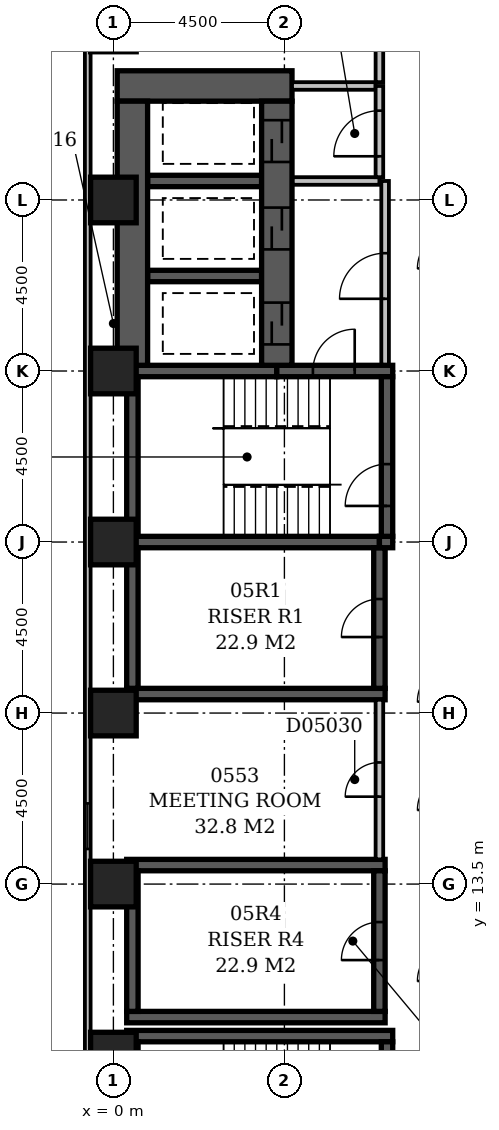
"""IFC4 building model, lengths in metres.
Left out: names, types, materials, properties, quantities, classifications, styles, units other than length and angle.
Written with IfcOpenShell. Run it as: python <this file> out.ifc"""

import sys

from ifc_helpers import new_model, si_unit, direction, frame, frame_2d, origin, origin_2d, place, context, subcontext, project, spatial, rectangle, extrude, element, fill, save


model = new_model("IFC4")
c1 = context("Model", 3, precision=1e-05, world=origin(), true_north=direction((0.0, 1.0)))
c2 = subcontext(c1, "Body", "Model", "MODEL_VIEW")
j1 = project(units=[si_unit("LENGTHUNIT", "METRE"), si_unit("PLANEANGLEUNIT", "RADIAN")], contexts=[c1])
p1 = place(None, origin())
s1 = spatial("IfcSite", under=j1, at=p1, CompositionType="ELEMENT")
p2 = place(p1, origin())
s2 = spatial("IfcBuilding", under=s1, at=p2, CompositionType="ELEMENT")
p3 = place(p2, frame((0.0, 0.0, 29.0)))
s3 = spatial("IfcBuildingStorey", under=s2, at=p3, CompositionType="ELEMENT", Elevation=29.0)
p4 = place(p3, frame((0.1, 34.5, -0.3), z_axis=(0.0, 0.0, 1.0), x_axis=(1.0, 0.0, 0.0)))
e1 = element("IfcWall", 1, at=p4, inside=s3, PredefinedType="SHEAR", context=c2, shape_type="SweptSolid", body=[
    extrude(rectangle(XDim=4.6, YDim=0.8, at=frame_2d((2.3, 0.0))), origin(), (0.0, 0.0, 1.0), 3.6),
])
p5 = place(p3, frame((0.35, 9.5, -0.3), z_axis=(0.0, 0.0, 1.0), x_axis=(1.0, 0.0, 0.0)))
e2 = element("IfcWall", 2, at=p5, inside=s3, PredefinedType="SHEAR", context=c2, shape_type="SweptSolid", body=[
    extrude(rectangle(XDim=7.0, YDim=0.3, at=frame_2d((3.5, 0.0))), origin(), (0.0, 0.0, 1.0), 3.6),
])
for number, where, z_axis, x_axis in (
    (3, (0.35, 10.0, -0.3), (0.0, 0.0, 1.0), (1.0, 0.0, 0.0)),
    (4, (0.35, 14.0, -0.3), (0.0, 0.0, 1.0), (1.0, 0.0, 0.0)),
    (5, (0.35, 18.5, -0.3), (0.0, 0.0, 1.0), (1.0, 0.0, 0.0)),
):
    element("IfcWall", number, at=place(p3, frame(where, z_axis=z_axis, x_axis=x_axis)), inside=s3, PredefinedType="SHEAR", context=c2, shape_type="SweptSolid", body=[
        extrude(rectangle(XDim=6.8, YDim=0.3, at=frame_2d((3.4, 0.0))), origin(), (0.0, 0.0, 1.0), 3.6),
    ])
p6 = place(p3, frame((0.35, 22.5, -0.3), z_axis=(0.0, 0.0, 1.0), x_axis=(1.0, 0.0, 0.0)))
e6 = element("IfcWall", 6, at=p6, inside=s3, PredefinedType="SHEAR", context=c2, shape_type="SweptSolid", body=[
    extrude(rectangle(XDim=6.65, YDim=0.3, at=frame_2d((3.325, 0.0))), origin(), (0.0, 0.0, 1.0), 3.6),
])
p7 = place(p3, frame((0.35, 27.0, -0.3), z_axis=(0.0, 0.0, 1.0), x_axis=(1.0, 0.0, 0.0)))
e7 = element("IfcWall", 7, at=p7, inside=s3, PredefinedType="SHEAR", context=c2, shape_type="SweptSolid", body=[
    extrude(rectangle(XDim=3.95, YDim=0.3, at=frame_2d((1.975, 0.0))), origin(), (0.0, 0.0, 1.0), 3.6),
])
p8 = place(p3, frame((0.5, 5.15, -0.3), z_axis=(0.0, 0.0, 1.0), x_axis=(0.0, 1.0, 0.0)))
e8 = element("IfcWall", 8, at=p8, inside=s3, PredefinedType="SHEAR", context=c2, shape_type="SweptSolid", body=[
    extrude(rectangle(XDim=4.2, YDim=0.3, at=frame_2d((2.1, 0.0))), origin(), (0.0, 0.0, 1.0), 3.6),
])
for number, where, z_axis, x_axis in (
    (9, (0.5, 10.15, -0.3), (0.0, 0.0, 1.0), (0.0, 1.0, 0.0)),
    (10, (0.5, 18.65, -0.3), (0.0, 0.0, 1.0), (0.0, 1.0, 0.0)),
):
    element("IfcWall", number, at=place(p3, frame(where, z_axis=z_axis, x_axis=x_axis)), inside=s3, PredefinedType="SHEAR", context=c2, shape_type="SweptSolid", body=[
        extrude(rectangle(XDim=3.7, YDim=0.3, at=frame_2d((1.85, 0.0))), origin(), (0.0, 0.0, 1.0), 3.6),
    ])
p9 = place(p3, frame((0.5, 22.65, -0.3), z_axis=(0.0, 0.0, 1.0), x_axis=(0.0, 1.0, 0.0)))
e11 = element("IfcWall", 11, at=p9, inside=s3, PredefinedType="SHEAR", context=c2, shape_type="SweptSolid", body=[
    extrude(rectangle(XDim=4.2, YDim=0.3, at=frame_2d((2.1, 0.0))), origin(), (0.0, 0.0, 1.0), 3.6),
])
p10 = place(p3, frame((0.5, 27.15, -0.3), z_axis=(0.0, 0.0, 1.0), x_axis=(0.0, 1.0, 0.0)))
e12 = element("IfcWall", 12, at=p10, inside=s3, PredefinedType="SHEAR", context=c2, shape_type="SweptSolid", body=[
    extrude(rectangle(XDim=6.95, YDim=0.8, at=frame_2d((3.475, 0.0))), origin(), (0.0, 0.0, 1.0), 3.6),
])
for number, where, z_axis, x_axis in (
    (13, (0.9, 29.5, -0.3), (0.0, 0.0, 1.0), (1.0, 0.0, 0.0)),
    (14, (0.9, 32.0, -0.3), (0.0, 0.0, 1.0), (1.0, 0.0, 0.0)),
):
    element("IfcWall", number, at=place(p3, frame(where, z_axis=z_axis, x_axis=x_axis)), inside=s3, PredefinedType="SHEAR", context=c2, shape_type="SweptSolid", body=[
        extrude(rectangle(XDim=3.0, YDim=0.3, at=frame_2d((1.5, 0.0))), origin(), (0.0, 0.0, 1.0), 3.6),
    ])
p11 = place(p3, frame((4.3, 27.0, -0.3), z_axis=(0.0, 0.0, 1.0), x_axis=(1.0, 0.0, 0.0)))
e15 = element("IfcWall", 15, at=p11, inside=s3, PredefinedType="SHEAR", context=c2, shape_type="SweptSolid", body=[
    extrude(rectangle(XDim=3.05, YDim=0.3, at=frame_2d((1.525, 0.0))), origin(), (0.0, 0.0, 1.0), 3.6),
])
p12 = place(p11, frame((0.95, 0.0, 0.3)))
e16 = element("IfcOpeningElement", 16, at=p12, cuts=e15, PredefinedType="OPENING", context=c2, shape_type="SweptSolid", body=[
    extrude(rectangle(XDim=1.1, YDim=2.1, at=frame_2d((0.55, 1.05))), frame((0.0, 0.162, 0.0), z_axis=(0.0, -1.0, 0.0), x_axis=(1.0, 0.0, 0.0)), (0.0, 0.0, 1.0), 0.324),
])
p13 = place(p3, frame((4.3, 27.15, -0.3), z_axis=(0.0, 0.0, 1.0), x_axis=(0.0, 1.0, 0.0)))
e17 = element("IfcWall", 17, at=p13, inside=s3, PredefinedType="SHEAR", context=c2, shape_type="SweptSolid", body=[
    extrude(rectangle(XDim=6.95, YDim=0.8, at=frame_2d((3.475, 0.0))), origin(), (0.0, 0.0, 1.0), 3.6),
])
p14 = place(p13, frame((3.05, 0.0, 0.3)))
e18 = element("IfcOpeningElement", 18, at=p14, cuts=e17, PredefinedType="OPENING", context=c2, shape_type="SweptSolid", body=[
    extrude(rectangle(XDim=1.1, YDim=2.1, at=frame_2d((0.55, 1.05))), frame((0.0, 0.412, 0.0), z_axis=(0.0, -1.0, 0.0), x_axis=(1.0, 0.0, 0.0)), (0.0, 0.0, 1.0), 0.824),
])
p15 = place(p13, frame((0.55, 0.0, 0.3)))
e19 = element("IfcOpeningElement", 19, at=p15, cuts=e17, PredefinedType="OPENING", context=c2, shape_type="SweptSolid", body=[
    extrude(rectangle(XDim=1.1, YDim=2.1, at=frame_2d((0.55, 1.05))), frame((0.0, 0.412, 0.0), z_axis=(0.0, -1.0, 0.0), x_axis=(1.0, 0.0, 0.0)), (0.0, 0.0, 1.0), 0.824),
])
p16 = place(p13, frame((5.35, 0.0, 0.3)))
e20 = element("IfcOpeningElement", 20, at=p16, cuts=e17, PredefinedType="OPENING", context=c2, shape_type="SweptSolid", body=[
    extrude(rectangle(XDim=1.1, YDim=2.1, at=frame_2d((0.55, 1.05))), frame((0.0, 0.412, 0.0), z_axis=(0.0, -1.0, 0.0), x_axis=(1.0, 0.0, 0.0)), (0.0, 0.0, 1.0), 0.824),
])
p17 = place(p3, frame((7.0, 10.15, -0.3), z_axis=(0.0, 0.0, 1.0), x_axis=(0.0, 1.0, 0.0)))
e21 = element("IfcWall", 21, at=p17, inside=s3, PredefinedType="SHEAR", context=c2, shape_type="SweptSolid", body=[
    extrude(rectangle(XDim=3.7, YDim=0.3, at=frame_2d((1.85, 0.0))), origin(), (0.0, 0.0, 1.0), 3.6),
])
p18 = place(p17, frame((1.35, 0.0, 0.3)))
e22 = element("IfcOpeningElement", 22, at=p18, cuts=e21, PredefinedType="OPENING", context=c2, shape_type="SweptSolid", body=[
    extrude(rectangle(XDim=1.0, YDim=2.1, at=frame_2d((0.5, 1.05))), frame((0.0, 0.162, 0.0), z_axis=(0.0, -1.0, 0.0), x_axis=(1.0, 0.0, 0.0)), (0.0, 0.0, 1.0), 0.324),
])
p19 = place(p3, frame((7.0, 18.65, -0.3), z_axis=(0.0, 0.0, 1.0), x_axis=(0.0, 1.0, 0.0)))
e23 = element("IfcWall", 23, at=p19, inside=s3, PredefinedType="SHEAR", context=c2, shape_type="SweptSolid", body=[
    extrude(rectangle(XDim=3.7, YDim=0.3, at=frame_2d((1.85, 0.0))), origin(), (0.0, 0.0, 1.0), 3.6),
])
p20 = place(p19, frame((1.35, 0.0, 0.3)))
e24 = element("IfcOpeningElement", 24, at=p20, cuts=e23, PredefinedType="OPENING", context=c2, shape_type="SweptSolid", body=[
    extrude(rectangle(XDim=1.0, YDim=2.1, at=frame_2d((0.5, 1.05))), frame((0.0, 0.162, 0.0), z_axis=(0.0, -1.0, 0.0), x_axis=(1.0, 0.0, 0.0)), (0.0, 0.0, 1.0), 0.324),
])
p21 = place(p3, frame((7.0, 22.5, -0.3), z_axis=(0.0, 0.0, 1.0), x_axis=(1.0, 0.0, 0.0)))
e25 = element("IfcWall", 25, at=p21, inside=s3, PredefinedType="SHEAR", context=c2, shape_type="SweptSolid", body=[
    extrude(rectangle(XDim=0.35, YDim=0.3, at=frame_2d((0.175, 0.0))), origin(), (0.0, 0.0, 1.0), 3.6),
])
p22 = place(p3, frame((7.2, 5.15, -0.3), z_axis=(0.0, 0.0, 1.0), x_axis=(0.0, 1.0, 0.0)))
e26 = element("IfcWall", 26, at=p22, inside=s3, PredefinedType="SHEAR", context=c2, shape_type="SweptSolid", body=[
    extrude(rectangle(XDim=4.2, YDim=0.3, at=frame_2d((2.1, 0.0))), origin(), (0.0, 0.0, 1.0), 3.6),
])
p23 = place(p22, frame((1.55, 0.0, 0.3)))
e27 = element("IfcOpeningElement", 27, at=p23, cuts=e26, PredefinedType="OPENING", context=c2, shape_type="SweptSolid", body=[
    extrude(rectangle(XDim=1.1, YDim=2.1, at=frame_2d((0.55, 1.05))), frame((0.0, 0.162, 0.0), z_axis=(0.0, -1.0, 0.0), x_axis=(1.0, 0.0, 0.0)), (0.0, 0.0, 1.0), 0.324),
])
p24 = place(p3, frame((7.2, 22.65, -0.3), z_axis=(0.0, 0.0, 1.0), x_axis=(0.0, 1.0, 0.0)))
e28 = element("IfcWall", 28, at=p24, inside=s3, PredefinedType="SHEAR", context=c2, shape_type="SweptSolid", body=[
    extrude(rectangle(XDim=4.2, YDim=0.3, at=frame_2d((2.1, 0.0))), origin(), (0.0, 0.0, 1.0), 3.6),
])
p25 = place(p24, frame((0.8, 0.0, 0.3)))
e29 = element("IfcOpeningElement", 29, at=p25, cuts=e28, PredefinedType="OPENING", context=c2, shape_type="SweptSolid", body=[
    extrude(rectangle(XDim=1.1, YDim=2.1, at=frame_2d((0.55, 1.05))), frame((0.0, 0.162, 0.0), z_axis=(0.0, -1.0, 0.0), x_axis=(1.0, 0.0, 0.0)), (0.0, 0.0, 1.0), 0.324),
])
for number, where, z_axis, x_axis in (
    (30, (0.0, 9.0, -0.3), (0.0, 0.0, 1.0), (1.0, 0.0, 0.0)),
    (31, (0.0, 13.5, -0.3), (0.0, 0.0, 1.0), (1.0, 0.0, 0.0)),
    (32, (0.0, 18.0, -0.3), (0.0, 0.0, 1.0), (1.0, 0.0, 0.0)),
    (33, (0.0, 22.5, -0.3), (0.0, 0.0, 1.0), (1.0, 0.0, 0.0)),
    (34, (0.0, 27.0, -0.3), (0.0, 0.0, 1.0), (1.0, 0.0, 0.0)),
    (35, (0.0, 31.5, -0.3), (0.0, 0.0, 1.0), (1.0, 0.0, 0.0)),
):
    element("IfcColumn", number, at=place(p3, frame(where, z_axis=z_axis, x_axis=x_axis)), inside=s3, PredefinedType="COLUMN", context=c2, shape_type="SweptSolid", body=[
        extrude(rectangle(XDim=1.2, YDim=1.2, at=origin_2d()), origin(), (0.0, 0.0, 1.0), 3.6),
    ])
p26 = place(p3, frame((-0.675, 59.1, 0.0), z_axis=(0.0, 0.0, 1.0), x_axis=(0.0, -1.0, 0.0)))
e36 = element("IfcWall", 36, at=p26, inside=s3, PredefinedType="STANDARD", context=c2, shape_type="SweptSolid", body=[
    extrude(rectangle(XDim=55.35, YDim=0.15, at=frame_2d((27.675, 0.0))), origin(), (0.0, 0.0, 1.0), 2.7),
])
p27 = place(p26, frame((10.523, 0.0, 0.6)))
e37 = element("IfcOpeningElement", 37, at=p27, cuts=e36, PredefinedType="OPENING", context=c2, shape_type="SweptSolid", body=[
    extrude(rectangle(XDim=1.2, YDim=1.8, at=frame_2d((0.6, 0.9))), frame((0.0, 0.087, 0.0), z_axis=(0.0, -1.0, 0.0), x_axis=(1.0, 0.0, 0.0)), (0.0, 0.0, 1.0), 0.174),
])
p28 = place(p26, frame((16.477, 0.0, 0.6)))
e38 = element("IfcOpeningElement", 38, at=p28, cuts=e36, PredefinedType="OPENING", context=c2, shape_type="SweptSolid", body=[
    extrude(rectangle(XDim=1.2, YDim=1.8, at=frame_2d((0.6, 0.9))), frame((0.0, 0.087, 0.0), z_axis=(0.0, -1.0, 0.0), x_axis=(1.0, 0.0, 0.0)), (0.0, 0.0, 1.0), 0.174),
])
p29 = place(p26, frame((19.65, 0.0, 0.6)))
e39 = element("IfcOpeningElement", 39, at=p29, cuts=e36, PredefinedType="OPENING", context=c2, shape_type="SweptSolid", body=[
    extrude(rectangle(XDim=2.4, YDim=1.8, at=frame_2d((1.2, 0.9))), frame((0.0, 0.087, 0.0), z_axis=(0.0, -1.0, 0.0), x_axis=(1.0, 0.0, 0.0)), (0.0, 0.0, 1.0), 0.174),
])
p30 = place(p26, frame((43.477, 0.0, 0.6)))
e40 = element("IfcOpeningElement", 40, at=p30, cuts=e36, PredefinedType="OPENING", context=c2, shape_type="SweptSolid", body=[
    extrude(rectangle(XDim=1.2, YDim=1.8, at=frame_2d((0.6, 0.9))), frame((0.0, 0.087, 0.0), z_axis=(0.0, -1.0, 0.0), x_axis=(1.0, 0.0, 0.0)), (0.0, 0.0, 1.0), 0.174),
])
p31 = place(p3, frame((4.72, 32.0, 0.0), z_axis=(0.0, 0.0, 1.0), x_axis=(1.0, 0.0, 0.0)))
e41 = element("IfcWall", 41, at=p31, inside=s3, PredefinedType="PARTITIONING", context=c2, shape_type="SweptSolid", body=[
    extrude(rectangle(XDim=2.28, YDim=0.2, at=frame_2d((1.14, 0.0))), origin(), (0.0, 0.0, 1.0), 3.3),
])
p32 = place(p3, frame((7.0, 32.1, 0.0), z_axis=(0.0, 0.0, 1.0), x_axis=(0.0, 1.0, 0.0)))
e42 = element("IfcWall", 42, at=p32, inside=s3, PredefinedType="PARTITIONING", context=c2, shape_type="SweptSolid", body=[
    extrude(rectangle(XDim=2.4, YDim=0.2, at=frame_2d((1.2, 0.0))), origin(), (0.0, 0.0, 1.0), 3.3),
])
p33 = place(p32, frame((0.55, 0.0, 0.0)))
e43 = element("IfcOpeningElement", 43, at=p33, cuts=e42, PredefinedType="OPENING", context=c2, shape_type="SweptSolid", body=[
    extrude(rectangle(XDim=1.2, YDim=2.1, at=frame_2d((0.6, 1.05))), frame((0.0, 0.112, 0.0), z_axis=(0.0, -1.0, 0.0), x_axis=(1.0, 0.0, 0.0)), (0.0, 0.0, 1.0), 0.224),
])
p34 = place(p3, frame((4.7, 34.5, 0.0), z_axis=(0.0, 0.0, 1.0), x_axis=(1.0, 0.0, 0.0)))
e44 = element("IfcWall", 44, at=p34, inside=s3, PredefinedType="PARTITIONING", context=c2, shape_type="SweptSolid", body=[
    extrude(rectangle(XDim=2.2, YDim=0.2, at=frame_2d((1.1, 0.0))), origin(), (0.0, 0.0, 1.0), 3.3),
])
p35 = place(p3, frame((7.15, 27.17, 0.0), z_axis=(0.0, 0.0, 1.0), x_axis=(0.0, 1.0, 0.0)))
e45 = element("IfcWall", 45, at=p35, inside=s3, PredefinedType="PARTITIONING", context=c2, shape_type="SweptSolid", body=[
    extrude(rectangle(XDim=4.83, YDim=0.2, at=frame_2d((2.415, 0.0))), origin(), (0.0, 0.0, 1.0), 3.3),
])
p36 = place(p35, frame((1.73, 0.0, 0.0)))
e46 = element("IfcOpeningElement", 46, at=p36, cuts=e45, PredefinedType="OPENING", context=c2, shape_type="SweptSolid", body=[
    extrude(rectangle(XDim=1.2, YDim=2.1, at=frame_2d((0.6, 1.05))), frame((0.0, 0.112, 0.0), z_axis=(0.0, -1.0, 0.0), x_axis=(1.0, 0.0, 0.0)), (0.0, 0.0, 1.0), 0.224),
])
p37 = place(p3, frame((7.0, 14.15, 0.0), z_axis=(0.0, 0.0, 1.0), x_axis=(0.0, 1.0, 0.0)))
e47 = element("IfcWall", 47, at=p37, inside=s3, PredefinedType="PARTITIONING", context=c2, shape_type="SweptSolid", body=[
    extrude(rectangle(XDim=4.2, YDim=0.2, at=frame_2d((2.1, 0.0))), origin(), (0.0, 0.0, 1.0), 3.3),
])
p38 = place(p37, frame((1.65, 0.0, 0.0)))
e48 = element("IfcOpeningElement", 48, at=p38, cuts=e47, PredefinedType="OPENING", context=c2, shape_type="SweptSolid", body=[
    extrude(rectangle(XDim=0.9, YDim=2.1, at=frame_2d((0.45, 1.05))), frame((0.0, 0.112, 0.0), z_axis=(0.0, -1.0, 0.0), x_axis=(1.0, 0.0, 0.0)), (0.0, 0.0, 1.0), 0.224),
])
p39 = place(p3, frame((7.0, 34.6, 0.0), z_axis=(0.0, 0.0, 1.0), x_axis=(0.0, 1.0, 0.0)))
e49 = element("IfcWall", 49, at=p39, inside=s3, PredefinedType="PARTITIONING", context=c2, shape_type="SweptSolid", body=[
    extrude(rectangle(XDim=14.8, YDim=0.2, at=frame_2d((7.4, 0.0))), origin(), (0.0, 0.0, 1.0), 3.3),
])
p40 = place(p39, frame((6.95, 0.0, 0.0)))
e50 = element("IfcOpeningElement", 50, at=p40, cuts=e49, PredefinedType="OPENING", context=c2, shape_type="SweptSolid", body=[
    extrude(rectangle(XDim=0.9, YDim=2.1, at=frame_2d((0.45, 1.05))), frame((0.0, 0.112, 0.0), z_axis=(0.0, -1.0, 0.0), x_axis=(1.0, 0.0, 0.0)), (0.0, 0.0, 1.0), 0.224),
])
p41 = place(p30, origin())
e51 = element("IfcWindow", 51, at=p41, inside=s3, PartitioningType="SINGLE_PANEL", PredefinedType="WINDOW", context=c2, shape_type="SweptSolid", body=[
    extrude(rectangle(XDim=1.2, YDim=1.8, at=frame_2d((0.6, 0.9))), frame((0.0, 0.03, 0.0), z_axis=(0.0, -1.0, 0.0), x_axis=(1.0, 0.0, 0.0)), (0.0, 0.0, 1.0), 0.06),
])
fill(e40, e51)
p42 = place(p36, origin())
e52 = element("IfcDoor", 52, at=p42, inside=s3, OperationType="SINGLE_SWING_LEFT", PredefinedType="DOOR", context=c2, shape_type="SweptSolid", body=[
    extrude(rectangle(XDim=1.2, YDim=2.1, at=frame_2d((0.6, 1.05))), frame((0.0, 0.025, 0.0), z_axis=(0.0, -1.0, 0.0), x_axis=(1.0, 0.0, 0.0)), (0.0, 0.0, 1.0), 0.05),
])
fill(e46, e52)
p43 = place(p14, origin())
e53 = element("IfcDoor", 53, at=p43, inside=s3, OperationType="SLIDING_TO_LEFT", PredefinedType="DOOR", context=c2, shape_type="SweptSolid", body=[
    extrude(rectangle(XDim=1.1, YDim=2.1, at=frame_2d((0.55, 1.05))), frame((0.0, 0.025, 0.0), z_axis=(0.0, -1.0, 0.0), x_axis=(1.0, 0.0, 0.0)), (0.0, 0.0, 1.0), 0.05),
])
fill(e18, e53)
p44 = place(p15, origin())
e54 = element("IfcDoor", 54, at=p44, inside=s3, OperationType="SLIDING_TO_LEFT", PredefinedType="DOOR", context=c2, shape_type="SweptSolid", body=[
    extrude(rectangle(XDim=1.1, YDim=2.1, at=frame_2d((0.55, 1.05))), frame((0.0, 0.025, 0.0), z_axis=(0.0, -1.0, 0.0), x_axis=(1.0, 0.0, 0.0)), (0.0, 0.0, 1.0), 0.05),
])
fill(e19, e54)
p45 = place(p33, origin())
e55 = element("IfcDoor", 55, at=p45, inside=s3, OperationType="SINGLE_SWING_LEFT", PredefinedType="DOOR", context=c2, shape_type="SweptSolid", body=[
    extrude(rectangle(XDim=1.2, YDim=2.1, at=frame_2d((0.6, 1.05))), frame((0.0, 0.025, 0.0), z_axis=(0.0, -1.0, 0.0), x_axis=(1.0, 0.0, 0.0)), (0.0, 0.0, 1.0), 0.05),
])
fill(e43, e55)
p46 = place(p16, origin())
e56 = element("IfcDoor", 56, at=p46, inside=s3, OperationType="SLIDING_TO_LEFT", PredefinedType="DOOR", context=c2, shape_type="SweptSolid", body=[
    extrude(rectangle(XDim=1.1, YDim=2.1, at=frame_2d((0.55, 1.05))), frame((0.0, 0.025, 0.0), z_axis=(0.0, -1.0, 0.0), x_axis=(1.0, 0.0, 0.0)), (0.0, 0.0, 1.0), 0.05),
])
fill(e20, e56)
p47 = place(p20, origin())
e57 = element("IfcDoor", 57, at=p47, inside=s3, OperationType="SINGLE_SWING_LEFT", PredefinedType="DOOR", context=c2, shape_type="SweptSolid", body=[
    extrude(rectangle(XDim=1.0, YDim=2.1, at=frame_2d((0.5, 1.05))), frame((0.0, 0.025, 0.0), z_axis=(0.0, -1.0, 0.0), x_axis=(1.0, 0.0, 0.0)), (0.0, 0.0, 1.0), 0.05),
])
fill(e24, e57)
p48 = place(p18, origin())
e58 = element("IfcDoor", 58, at=p48, inside=s3, OperationType="SINGLE_SWING_LEFT", PredefinedType="DOOR", context=c2, shape_type="SweptSolid", body=[
    extrude(rectangle(XDim=1.0, YDim=2.1, at=frame_2d((0.5, 1.05))), frame((0.0, 0.025, 0.0), z_axis=(0.0, -1.0, 0.0), x_axis=(1.0, 0.0, 0.0)), (0.0, 0.0, 1.0), 0.05),
])
fill(e22, e58)
p49 = place(p12, frame((1.1, 0.0, 0.0), z_axis=(0.0, 0.0, 1.0), x_axis=(-1.0, 0.0, 0.0)))
e59 = element("IfcDoor", 59, at=p49, inside=s3, OperationType="SINGLE_SWING_LEFT", PredefinedType="DOOR", context=c2, shape_type="SweptSolid", body=[
    extrude(rectangle(XDim=1.1, YDim=2.1, at=frame_2d((0.55, 1.05))), frame((0.0, 0.025, 0.0), z_axis=(0.0, -1.0, 0.0), x_axis=(1.0, 0.0, 0.0)), (0.0, 0.0, 1.0), 0.05),
])
fill(e16, e59)
p50 = place(p25, origin())
e60 = element("IfcDoor", 60, at=p50, inside=s3, OperationType="SINGLE_SWING_LEFT", PredefinedType="DOOR", context=c2, shape_type="SweptSolid", body=[
    extrude(rectangle(XDim=1.1, YDim=2.1, at=frame_2d((0.55, 1.05))), frame((0.0, 0.025, 0.0), z_axis=(0.0, -1.0, 0.0), x_axis=(1.0, 0.0, 0.0)), (0.0, 0.0, 1.0), 0.05),
])
fill(e29, e60)
p51 = place(p38, origin())
e61 = element("IfcDoor", 61, at=p51, inside=s3, OperationType="SINGLE_SWING_LEFT", PredefinedType="DOOR", context=c2, shape_type="SweptSolid", body=[
    extrude(rectangle(XDim=0.9, YDim=2.1, at=frame_2d((0.45, 1.05))), frame((0.0, 0.025, 0.0), z_axis=(0.0, -1.0, 0.0), x_axis=(1.0, 0.0, 0.0)), (0.0, 0.0, 1.0), 0.05),
])
fill(e48, e61)
save(model, sys.argv[1])
